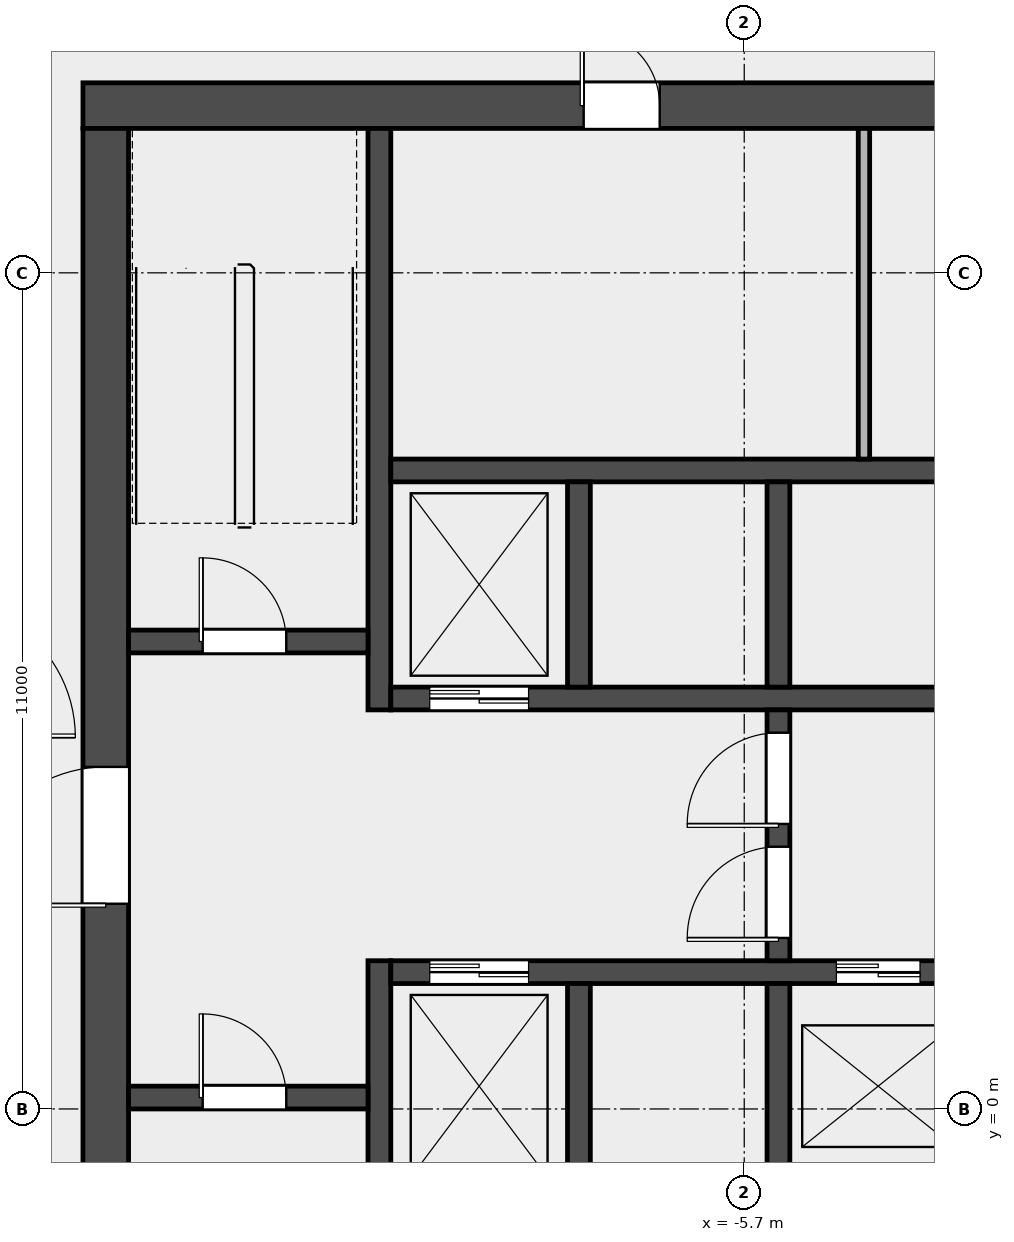
"""IFC4 building model, lengths in metres.
Left out: names, types, materials, properties, quantities, classifications, styles, units other than length and angle.
Written with IfcOpenShell. Run it as: python <this file> out.ifc"""

import sys

from ifc_helpers import new_model, si_unit, direction, frame, frame_2d, origin, place, context, subcontext, project, spatial, rectangle, extrude, element, fill, save


model = new_model("IFC4")
c1 = context("Model", 3, precision=1e-05, world=origin(), true_north=direction((0.0, 1.0)))
c2 = subcontext(c1, "Body", "Model", "MODEL_VIEW")
j1 = project(units=[si_unit("LENGTHUNIT", "METRE"), si_unit("PLANEANGLEUNIT", "RADIAN")], contexts=[c1])
p1 = place(None, origin())
s1 = spatial("IfcSite", under=j1, at=p1, CompositionType="ELEMENT")
p2 = place(p1, origin())
s2 = spatial("IfcBuilding", under=s1, at=p2, CompositionType="ELEMENT")
p3 = place(p2, frame((0.0, 0.0, 126.1)))
s3 = spatial("IfcBuildingStorey", under=s2, at=p3, CompositionType="ELEMENT", Elevation=126.1)
p4 = place(p3, frame((-14.4, 13.2, 0.0), z_axis=(0.0, 0.0, 1.0), x_axis=(1.0, 0.0, 0.0)))
e1 = element("IfcWall", 1, at=p4, inside=s3, PredefinedType="SHEAR", context=c2, shape_type="SweptSolid", body=[
    extrude(rectangle(XDim=28.8, YDim=0.6, at=frame_2d((14.4, 0.0))), origin(), (0.0, 0.0, 1.0), 4.2),
])
p5 = place(p4, frame((6.587, 0.0, 0.0)))
e2 = element("IfcOpeningElement", 2, at=p5, cuts=e1, PredefinedType="OPENING", context=c2, shape_type="SweptSolid", body=[
    extrude(rectangle(XDim=1.0, YDim=2.1, at=frame_2d((0.5, 1.05))), frame((0.0, 0.312, 0.0), z_axis=(0.0, -1.0, 0.0), x_axis=(1.0, 0.0, 0.0)), (0.0, 0.0, 1.0), 0.624),
])
p6 = place(p4, frame((12.025, 0.0, 0.0)))
e3 = element("IfcOpeningElement", 3, at=p6, cuts=e1, PredefinedType="OPENING", context=c2, shape_type="SweptSolid", body=[
    extrude(rectangle(XDim=1.0, YDim=2.1, at=frame_2d((0.5, 1.05))), frame((0.0, 0.312, 0.0), z_axis=(0.0, -1.0, 0.0), x_axis=(1.0, 0.0, 0.0)), (0.0, 0.0, 1.0), 0.624),
])
p7 = place(p4, frame((17.462, 0.0, 0.0)))
e4 = element("IfcOpeningElement", 4, at=p7, cuts=e1, PredefinedType="OPENING", context=c2, shape_type="SweptSolid", body=[
    extrude(rectangle(XDim=1.0, YDim=2.1, at=frame_2d((0.5, 1.05))), frame((0.0, 0.312, 0.0), z_axis=(0.0, -1.0, 0.0), x_axis=(1.0, 0.0, 0.0)), (0.0, 0.0, 1.0), 0.624),
])
p8 = place(p4, frame((22.525, 0.0, 0.0)))
e5 = element("IfcOpeningElement", 5, at=p8, cuts=e1, PredefinedType="OPENING", context=c2, shape_type="SweptSolid", body=[
    extrude(rectangle(XDim=1.0, YDim=2.1, at=frame_2d((0.5, 1.05))), frame((0.0, 0.312, 0.0), z_axis=(0.0, -1.0, 0.0), x_axis=(1.0, 0.0, 0.0)), (0.0, 0.0, 1.0), 0.624),
])
p9 = place(p3, frame((-14.1, -6.6, 0.0), z_axis=(0.0, 0.0, 1.0), x_axis=(0.0, 1.0, 0.0)))
e6 = element("IfcWall", 6, at=p9, inside=s3, PredefinedType="SHEAR", context=c2, shape_type="SweptSolid", body=[
    extrude(rectangle(XDim=19.5, YDim=0.6, at=frame_2d((9.75, 0.0))), origin(), (0.0, 0.0, 1.0), 4.2),
])
p10 = place(p9, frame((9.3, 0.0, 0.0)))
e7 = element("IfcOpeningElement", 7, at=p10, cuts=e6, PredefinedType="OPENING", context=c2, shape_type="SweptSolid", body=[
    extrude(rectangle(XDim=1.8, YDim=2.1, at=frame_2d((0.9, 1.05))), frame((0.0, 0.312, 0.0), z_axis=(0.0, -1.0, 0.0), x_axis=(1.0, 0.0, 0.0)), (0.0, 0.0, 1.0), 0.624),
])
p11 = place(p3, frame((-10.5, -6.6, 0.0), z_axis=(0.0, 0.0, 1.0), x_axis=(0.0, 1.0, 0.0)))
e8 = element("IfcWall", 8, at=p11, inside=s3, PredefinedType="SHEAR", context=c2, shape_type="SweptSolid", body=[
    extrude(rectangle(XDim=8.55, YDim=0.3, at=frame_2d((4.275, 0.0))), origin(), (0.0, 0.0, 1.0), 4.2),
])
p12 = place(p3, frame((-10.5, 5.25, 0.0), z_axis=(0.0, 0.0, 1.0), x_axis=(0.0, 1.0, 0.0)))
e9 = element("IfcWall", 9, at=p12, inside=s3, PredefinedType="SHEAR", context=c2, shape_type="SweptSolid", body=[
    extrude(rectangle(XDim=7.65, YDim=0.3, at=frame_2d((3.825, 0.0))), origin(), (0.0, 0.0, 1.0), 4.2),
])
p13 = place(p3, frame((-13.8, 0.15, 0.0), z_axis=(0.0, 0.0, 1.0), x_axis=(1.0, 0.0, 0.0)))
e10 = element("IfcWall", 10, at=p13, inside=s3, PredefinedType="SOLIDWALL", context=c2, shape_type="SweptSolid", body=[
    extrude(rectangle(XDim=3.15, YDim=0.3, at=frame_2d((1.575, 0.0))), origin(), (0.0, 0.0, 1.0), 4.2),
])
p14 = place(p13, frame((0.975, 0.0, 0.0)))
e11 = element("IfcOpeningElement", 11, at=p14, cuts=e10, PredefinedType="OPENING", context=c2, shape_type="SweptSolid", body=[
    extrude(rectangle(XDim=1.1, YDim=2.1, at=frame_2d((0.55, 1.05))), frame((0.0, 0.162, 0.0), z_axis=(0.0, -1.0, 0.0), x_axis=(1.0, 0.0, 0.0)), (0.0, 0.0, 1.0), 0.324),
])
p15 = place(p3, frame((-13.8, 6.15, 0.0), z_axis=(0.0, 0.0, 1.0), x_axis=(1.0, 0.0, 0.0)))
e12 = element("IfcWall", 12, at=p15, inside=s3, PredefinedType="SOLIDWALL", context=c2, shape_type="SweptSolid", body=[
    extrude(rectangle(XDim=3.15, YDim=0.3, at=frame_2d((1.575, 0.0))), origin(), (0.0, 0.0, 1.0), 4.2),
])
p16 = place(p15, frame((0.975, 0.0, 0.0)))
e13 = element("IfcOpeningElement", 13, at=p16, cuts=e12, PredefinedType="OPENING", context=c2, shape_type="SweptSolid", body=[
    extrude(rectangle(XDim=1.1, YDim=2.1, at=frame_2d((0.55, 1.05))), frame((0.0, 0.162, 0.0), z_axis=(0.0, -1.0, 0.0), x_axis=(1.0, 0.0, 0.0)), (0.0, 0.0, 1.0), 0.324),
])
p17 = place(p3, frame((-10.35, 1.8, 0.0), z_axis=(0.0, 0.0, 1.0), x_axis=(1.0, 0.0, 0.0)))
e14 = element("IfcWall", 14, at=p17, inside=s3, PredefinedType="SOLIDWALL", context=c2, shape_type="SweptSolid", body=[
    extrude(rectangle(XDim=20.7, YDim=0.3, at=frame_2d((10.35, 0.0))), origin(), (0.0, 0.0, 1.0), 4.2),
])
p18 = place(p17, frame((0.512, 0.0, 0.0)))
e15 = element("IfcOpeningElement", 15, at=p18, cuts=e14, PredefinedType="OPENING", context=c2, shape_type="SweptSolid", body=[
    extrude(rectangle(XDim=1.3, YDim=2.1, at=frame_2d((0.65, 1.05))), frame((0.0, 0.162, 0.0), z_axis=(0.0, -1.0, 0.0), x_axis=(1.0, 0.0, 0.0)), (0.0, 0.0, 1.0), 0.324),
])
p19 = place(p17, frame((5.863, 0.0, 0.0)))
e16 = element("IfcOpeningElement", 16, at=p19, cuts=e14, PredefinedType="OPENING", context=c2, shape_type="SweptSolid", body=[
    extrude(rectangle(XDim=1.1, YDim=2.1, at=frame_2d((0.55, 1.05))), frame((0.0, 0.162, 0.0), z_axis=(0.0, -1.0, 0.0), x_axis=(1.0, 0.0, 0.0)), (0.0, 0.0, 1.0), 0.324),
])
p20 = place(p17, frame((8.488, 0.0, 0.0)))
e17 = element("IfcOpeningElement", 17, at=p20, cuts=e14, PredefinedType="OPENING", context=c2, shape_type="SweptSolid", body=[
    extrude(rectangle(XDim=1.1, YDim=2.1, at=frame_2d((0.55, 1.05))), frame((0.0, 0.162, 0.0), z_axis=(0.0, -1.0, 0.0), x_axis=(1.0, 0.0, 0.0)), (0.0, 0.0, 1.0), 0.324),
])
p21 = place(p17, frame((11.113, 0.0, 0.0)))
e18 = element("IfcOpeningElement", 18, at=p21, cuts=e14, PredefinedType="OPENING", context=c2, shape_type="SweptSolid", body=[
    extrude(rectangle(XDim=1.1, YDim=2.1, at=frame_2d((0.55, 1.05))), frame((0.0, 0.162, 0.0), z_axis=(0.0, -1.0, 0.0), x_axis=(1.0, 0.0, 0.0)), (0.0, 0.0, 1.0), 0.324),
])
p22 = place(p17, frame((13.738, 0.0, 0.0)))
e19 = element("IfcOpeningElement", 19, at=p22, cuts=e14, PredefinedType="OPENING", context=c2, shape_type="SweptSolid", body=[
    extrude(rectangle(XDim=1.1, YDim=2.1, at=frame_2d((0.55, 1.05))), frame((0.0, 0.162, 0.0), z_axis=(0.0, -1.0, 0.0), x_axis=(1.0, 0.0, 0.0)), (0.0, 0.0, 1.0), 0.324),
])
p23 = place(p17, frame((16.363, 0.0, 0.0)))
e20 = element("IfcOpeningElement", 20, at=p23, cuts=e14, PredefinedType="OPENING", context=c2, shape_type="SweptSolid", body=[
    extrude(rectangle(XDim=1.1, YDim=2.1, at=frame_2d((0.55, 1.05))), frame((0.0, 0.162, 0.0), z_axis=(0.0, -1.0, 0.0), x_axis=(1.0, 0.0, 0.0)), (0.0, 0.0, 1.0), 0.324),
])
p24 = place(p17, frame((18.988, 0.0, 0.0)))
e21 = element("IfcOpeningElement", 21, at=p24, cuts=e14, PredefinedType="OPENING", context=c2, shape_type="SweptSolid", body=[
    extrude(rectangle(XDim=1.1, YDim=2.1, at=frame_2d((0.55, 1.05))), frame((0.0, 0.162, 0.0), z_axis=(0.0, -1.0, 0.0), x_axis=(1.0, 0.0, 0.0)), (0.0, 0.0, 1.0), 0.324),
])
p25 = place(p3, frame((-10.35, 5.4, 0.0), z_axis=(0.0, 0.0, 1.0), x_axis=(1.0, 0.0, 0.0)))
e22 = element("IfcWall", 22, at=p25, inside=s3, PredefinedType="SOLIDWALL", context=c2, shape_type="SweptSolid", body=[
    extrude(rectangle(XDim=20.7, YDim=0.3, at=frame_2d((10.35, 0.0))), origin(), (0.0, 0.0, 1.0), 4.2),
])
p26 = place(p25, frame((0.512, 0.0, 0.0)))
e23 = element("IfcOpeningElement", 23, at=p26, cuts=e22, PredefinedType="OPENING", context=c2, shape_type="SweptSolid", body=[
    extrude(rectangle(XDim=1.3, YDim=2.1, at=frame_2d((0.65, 1.05))), frame((0.0, 0.162, 0.0), z_axis=(0.0, -1.0, 0.0), x_axis=(1.0, 0.0, 0.0)), (0.0, 0.0, 1.0), 0.324),
])
p27 = place(p3, frame((-10.35, 8.4, 0.0), z_axis=(0.0, 0.0, 1.0), x_axis=(1.0, 0.0, 0.0)))
e24 = element("IfcWall", 24, at=p27, inside=s3, PredefinedType="SOLIDWALL", context=c2, shape_type="SweptSolid", body=[
    extrude(rectangle(XDim=20.7, YDim=0.3, at=frame_2d((10.35, 0.0))), origin(), (0.0, 0.0, 1.0), 4.2),
])
for number, where, z_axis, x_axis in (
    (25, (-7.875, -1.05, 0.0), (0.0, 0.0, 1.0), (0.0, 1.0, 0.0)),
    (26, (-5.25, -1.05, 0.0), (0.0, 0.0, 1.0), (0.0, 1.0, 0.0)),
    (27, (-7.875, 5.55, 0.0), (0.0, 0.0, 1.0), (0.0, 1.0, 0.0)),
    (28, (-5.25, 5.55, 0.0), (0.0, 0.0, 1.0), (0.0, 1.0, 0.0)),
):
    element("IfcWall", number, at=place(p3, frame(where, z_axis=z_axis, x_axis=x_axis)), inside=s3, PredefinedType="SOLIDWALL", context=c2, shape_type="SweptSolid", body=[
        extrude(rectangle(XDim=2.7, YDim=0.3, at=frame_2d((1.35, 0.0))), origin(), (0.0, 0.0, 1.0), 4.2),
    ])
p28 = place(p3, frame((-5.25, 1.95, 0.0), z_axis=(0.0, 0.0, 1.0), x_axis=(0.0, 1.0, 0.0)))
e29 = element("IfcWall", 29, at=p28, inside=s3, PredefinedType="SOLIDWALL", context=c2, shape_type="SweptSolid", body=[
    extrude(rectangle(XDim=3.3, YDim=0.3, at=frame_2d((1.65, 0.0))), origin(), (0.0, 0.0, 1.0), 4.2),
])
p29 = place(p28, frame((0.3, 0.0, 0.0)))
e30 = element("IfcOpeningElement", 30, at=p29, cuts=e29, PredefinedType="OPENING", context=c2, shape_type="SweptSolid", body=[
    extrude(rectangle(XDim=1.2, YDim=2.1, at=frame_2d((0.6, 1.05))), frame((0.0, 0.162, 0.0), z_axis=(0.0, -1.0, 0.0), x_axis=(1.0, 0.0, 0.0)), (0.0, 0.0, 1.0), 0.324),
])
p30 = place(p28, frame((1.8, 0.0, 0.0)))
e31 = element("IfcOpeningElement", 31, at=p30, cuts=e29, PredefinedType="OPENING", context=c2, shape_type="SweptSolid", body=[
    extrude(rectangle(XDim=1.2, YDim=2.1, at=frame_2d((0.6, 1.05))), frame((0.0, 0.162, 0.0), z_axis=(0.0, -1.0, 0.0), x_axis=(1.0, 0.0, 0.0)), (0.0, 0.0, 1.0), 0.324),
])
p31 = place(p3, frame((-4.125, 8.55, 0.0), z_axis=(0.0, 0.0, 1.0), x_axis=(0.0, 1.0, 0.0)))
e32 = element("IfcWall", 32, at=p31, inside=s3, PredefinedType="PARTITIONING", context=c2, shape_type="SweptSolid", body=[
    extrude(rectangle(XDim=4.35, YDim=0.15, at=frame_2d((2.175, 0.0))), origin(), (0.0, 0.0, 1.0), 4.2),
])
p32 = place(p14, origin())
e33 = element("IfcDoor", 33, at=p32, inside=s3, OperationType="SINGLE_SWING_LEFT", PredefinedType="DOOR", context=c2, shape_type="SweptSolid", body=[
    extrude(rectangle(XDim=1.1, YDim=2.1, at=frame_2d((0.55, 1.05))), frame((0.0, 0.025, 0.0), z_axis=(0.0, -1.0, 0.0), x_axis=(1.0, 0.0, 0.0)), (0.0, 0.0, 1.0), 0.05),
])
fill(e11, e33)
p33 = place(p16, origin())
e34 = element("IfcDoor", 34, at=p33, inside=s3, OperationType="SINGLE_SWING_LEFT", PredefinedType="DOOR", context=c2, shape_type="SweptSolid", body=[
    extrude(rectangle(XDim=1.1, YDim=2.1, at=frame_2d((0.55, 1.05))), frame((0.0, 0.025, 0.0), z_axis=(0.0, -1.0, 0.0), x_axis=(1.0, 0.0, 0.0)), (0.0, 0.0, 1.0), 0.05),
])
fill(e13, e34)
p34 = place(p10, origin())
e35 = element("IfcDoor", 35, at=p34, inside=s3, OperationType="DOUBLE_DOOR_SINGLE_SWING", PredefinedType="DOOR", context=c2, shape_type="SweptSolid", body=[
    extrude(rectangle(XDim=1.8, YDim=2.1, at=frame_2d((0.9, 1.05))), frame((0.0, 0.025, 0.0), z_axis=(0.0, -1.0, 0.0), x_axis=(1.0, 0.0, 0.0)), (0.0, 0.0, 1.0), 0.05),
])
fill(e7, e35)
p35 = place(p29, origin())
e36 = element("IfcDoor", 36, at=p35, inside=s3, OperationType="SINGLE_SWING_LEFT", PredefinedType="DOOR", context=c2, shape_type="SweptSolid", body=[
    extrude(rectangle(XDim=1.2, YDim=2.1, at=frame_2d((0.6, 1.05))), frame((0.0, 0.025, 0.0), z_axis=(0.0, -1.0, 0.0), x_axis=(1.0, 0.0, 0.0)), (0.0, 0.0, 1.0), 0.05),
])
fill(e30, e36)
p36 = place(p30, origin())
e37 = element("IfcDoor", 37, at=p36, inside=s3, OperationType="SINGLE_SWING_RIGHT", PredefinedType="DOOR", context=c2, shape_type="SweptSolid", body=[
    extrude(rectangle(XDim=1.2, YDim=2.1, at=frame_2d((0.6, 1.05))), frame((0.0, 0.025, 0.0), z_axis=(0.0, -1.0, 0.0), x_axis=(1.0, 0.0, 0.0)), (0.0, 0.0, 1.0), 0.05),
])
fill(e31, e37)
p37 = place(p18, origin())
e38 = element("IfcDoor", 38, at=p37, inside=s3, OperationType="DOUBLE_DOOR_SLIDING", PredefinedType="DOOR", context=c2, shape_type="SweptSolid", body=[
    extrude(rectangle(XDim=1.3, YDim=2.1, at=frame_2d((0.65, 1.05))), frame((0.0, 0.025, 0.0), z_axis=(0.0, -1.0, 0.0), x_axis=(1.0, 0.0, 0.0)), (0.0, 0.0, 1.0), 0.05),
])
fill(e15, e38)
p38 = place(p19, origin())
e39 = element("IfcDoor", 39, at=p38, inside=s3, OperationType="DOUBLE_DOOR_SLIDING", PredefinedType="DOOR", context=c2, shape_type="SweptSolid", body=[
    extrude(rectangle(XDim=1.1, YDim=2.1, at=frame_2d((0.55, 1.05))), frame((0.0, 0.025, 0.0), z_axis=(0.0, -1.0, 0.0), x_axis=(1.0, 0.0, 0.0)), (0.0, 0.0, 1.0), 0.05),
])
fill(e16, e39)
p39 = place(p26, origin())
e40 = element("IfcDoor", 40, at=p39, inside=s3, OperationType="DOUBLE_DOOR_SLIDING", PredefinedType="DOOR", context=c2, shape_type="SweptSolid", body=[
    extrude(rectangle(XDim=1.3, YDim=2.1, at=frame_2d((0.65, 1.05))), frame((0.0, 0.025, 0.0), z_axis=(0.0, -1.0, 0.0), x_axis=(1.0, 0.0, 0.0)), (0.0, 0.0, 1.0), 0.05),
])
fill(e23, e40)
p40 = place(p5, origin())
e41 = element("IfcDoor", 41, at=p40, inside=s3, OperationType="SINGLE_SWING_LEFT", PredefinedType="DOOR", context=c2, shape_type="SweptSolid", body=[
    extrude(rectangle(XDim=1.0, YDim=2.1, at=frame_2d((0.5, 1.05))), frame((0.0, 0.025, 0.0), z_axis=(0.0, -1.0, 0.0), x_axis=(1.0, 0.0, 0.0)), (0.0, 0.0, 1.0), 0.05),
])
fill(e2, e41)
save(model, sys.argv[1])
